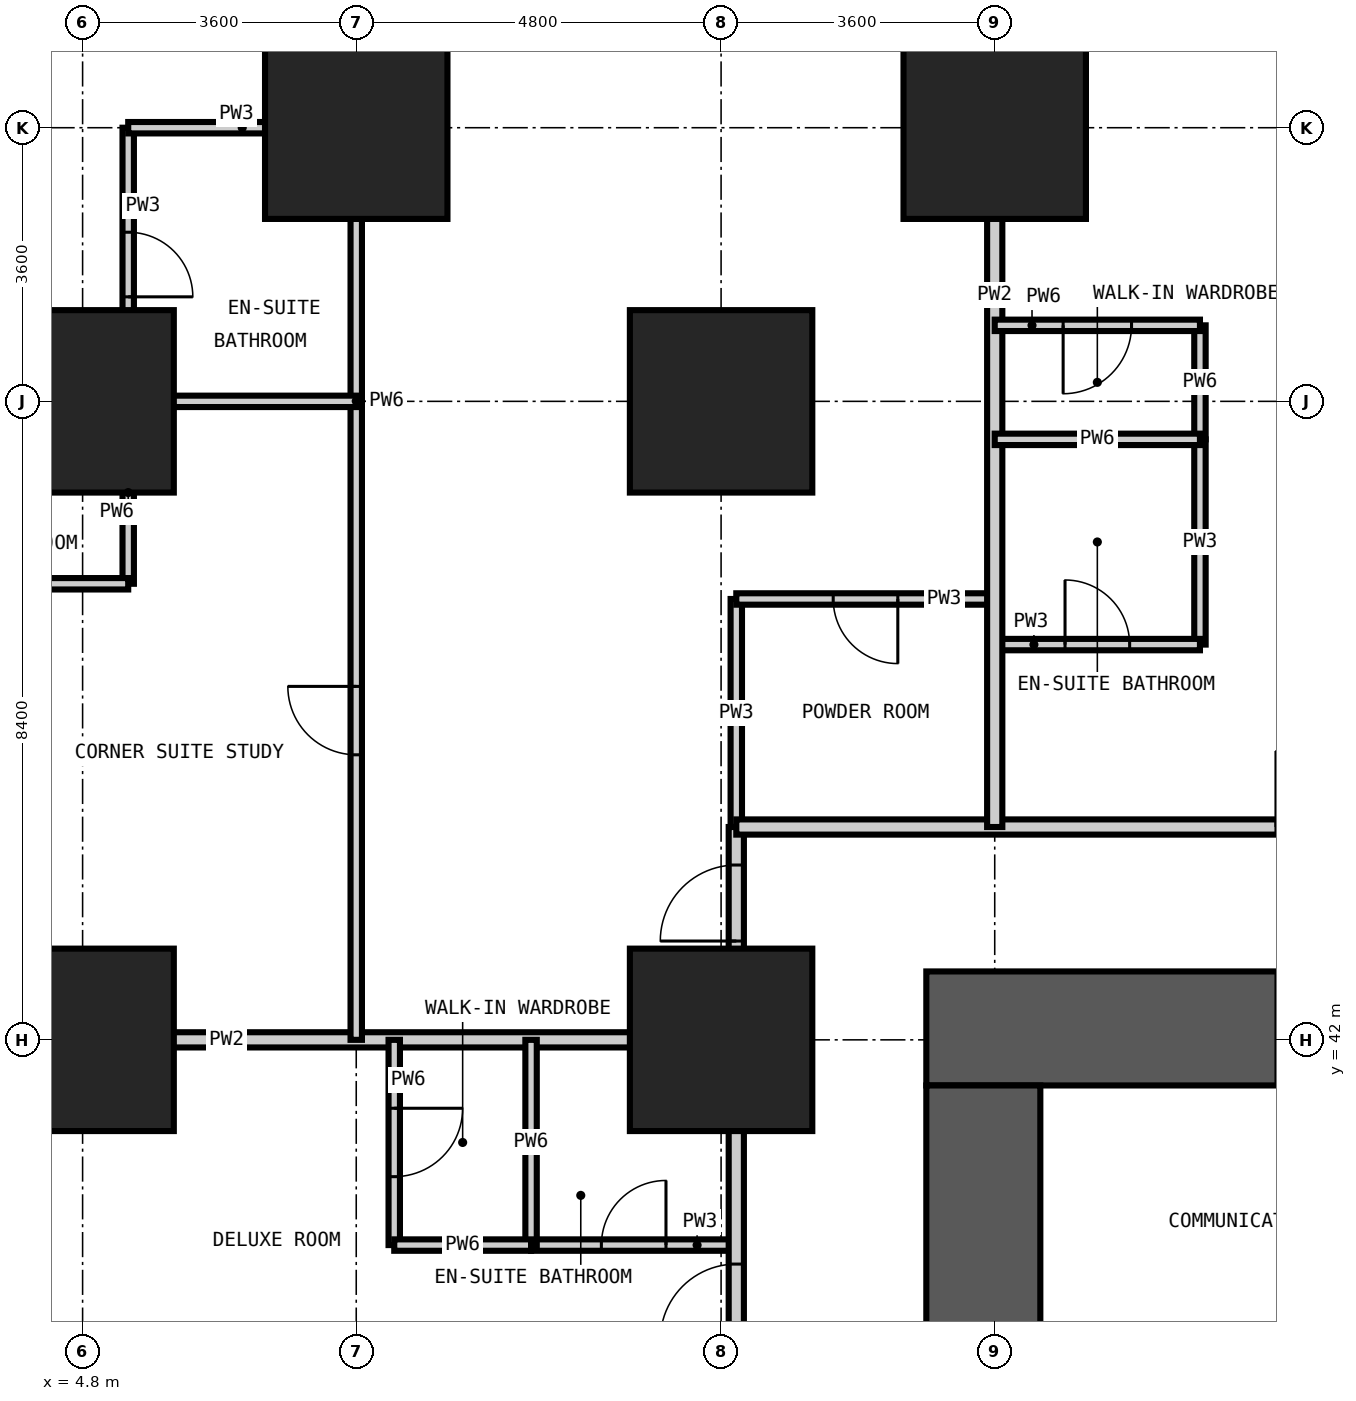
"""IFC4 building model, lengths in metres.
Left out: names, types, materials, properties, quantities, classifications, styles, units other than length and angle.
Written with IfcOpenShell. Run it as: python <this file> out.ifc"""

import sys

from ifc_helpers import new_model, si_unit, direction, frame, frame_2d, origin, origin_2d, place, context, subcontext, project, spatial, rectangle, extrude, element, fill, save


model = new_model("IFC4")
c1 = context("Model", 3, precision=1e-05, world=origin(), true_north=direction((0.0, 1.0)))
c2 = subcontext(c1, "Body", "Model", "MODEL_VIEW")
j1 = project(units=[si_unit("LENGTHUNIT", "METRE"), si_unit("PLANEANGLEUNIT", "RADIAN")], contexts=[c1])
p1 = place(None, origin())
s1 = spatial("IfcSite", under=j1, at=p1, CompositionType="ELEMENT")
p2 = place(p1, origin())
s2 = spatial("IfcBuilding", under=s1, at=p2, CompositionType="ELEMENT")
p3 = place(p2, frame((0.0, 0.0, 84.6)))
s3 = spatial("IfcBuildingStorey", under=s2, at=p3, CompositionType="ELEMENT", Elevation=84.6)
for number, where, z_axis, x_axis in (
    (1, (4.8, 42.0, -0.35), (0.0, 0.0, 1.0), (1.0, 0.0, 0.0)),
    (2, (4.8, 50.4, -0.35), (0.0, 0.0, 1.0), (1.0, 0.0, 0.0)),
    (3, (8.4, 54.0, -0.35), (0.0, 0.0, 1.0), (1.0, 0.0, 0.0)),
    (4, (13.2, 42.0, -0.35), (0.0, 0.0, 1.0), (1.0, 0.0, 0.0)),
    (5, (13.2, 50.4, -0.35), (0.0, 0.0, 1.0), (1.0, 0.0, 0.0)),
    (6, (16.8, 54.0, -0.35), (0.0, 0.0, 1.0), (1.0, 0.0, 0.0)),
):
    element("IfcColumn", number, at=place(p3, frame(where, z_axis=z_axis, x_axis=x_axis)), inside=s3, PredefinedType="COLUMN", context=c2, shape_type="SweptSolid", body=[
        extrude(rectangle(XDim=2.4, YDim=2.4, at=origin_2d()), origin(), (0.0, 0.0, 1.0), 3.55),
    ])
p4 = place(p3, frame((42.9, 42.15, -0.35), z_axis=(0.0, 0.0, 1.0), x_axis=(-1.0, 0.0, 0.0)))
e7 = element("IfcWall", 7, at=p4, inside=s3, PredefinedType="SHEAR", context=c2, shape_type="SweptSolid", body=[
    extrude(rectangle(XDim=27.0, YDim=1.5, at=frame_2d((13.5, 0.0))), origin(), (0.0, 0.0, 1.0), 3.55),
])
p5 = place(p4, frame((21.4, 0.0, 0.35)))
e8 = element("IfcOpeningElement", 8, at=p5, cuts=e7, PredefinedType="OPENING", context=c2, shape_type="SweptSolid", body=[
    extrude(rectangle(XDim=1.0, YDim=2.1, at=frame_2d((0.5, 1.05))), frame((0.0, 0.76, 0.0), z_axis=(0.0, -1.0, 0.0), x_axis=(1.0, 0.0, 0.0)), (0.0, 0.0, 1.0), 1.52),
])
p6 = place(p4, frame((10.8, 0.0, 0.35)))
e9 = element("IfcOpeningElement", 9, at=p6, cuts=e7, PredefinedType="OPENING", context=c2, shape_type="SweptSolid", body=[
    extrude(rectangle(XDim=1.2, YDim=2.2, at=frame_2d((0.6, 1.1))), frame((0.0, 0.76, 0.0), z_axis=(0.0, -1.0, 0.0), x_axis=(1.0, 0.0, 0.0)), (0.0, 0.0, 1.0), 1.52),
])
p7 = place(p3, frame((16.65, 41.4, -0.35), z_axis=(0.0, 0.0, 1.0), x_axis=(0.0, -1.0, 0.0)))
e10 = element("IfcWall", 10, at=p7, inside=s3, PredefinedType="SHEAR", context=c2, shape_type="SweptSolid", body=[
    extrude(rectangle(XDim=24.0, YDim=1.5, at=frame_2d((12.0, 0.0))), origin(), (0.0, 0.0, 1.0), 3.55),
])
p8 = place(p7, frame((11.1, 0.0, 0.35)))
e11 = element("IfcOpeningElement", 11, at=p8, cuts=e10, PredefinedType="OPENING", context=c2, shape_type="SweptSolid", body=[
    extrude(rectangle(XDim=1.8, YDim=2.2, at=frame_2d((0.9, 1.1))), frame((0.0, 0.76, 0.0), z_axis=(0.0, -1.0, 0.0), x_axis=(1.0, 0.0, 0.0)), (0.0, 0.0, 1.0), 1.52),
])
p9 = place(p7, frame((19.9, 0.0, 0.35)))
e12 = element("IfcOpeningElement", 12, at=p9, cuts=e10, PredefinedType="OPENING", context=c2, shape_type="SweptSolid", body=[
    extrude(rectangle(XDim=1.0, YDim=2.1, at=frame_2d((0.5, 1.05))), frame((0.0, 0.76, 0.0), z_axis=(0.0, -1.0, 0.0), x_axis=(1.0, 0.0, 0.0)), (0.0, 0.0, 1.0), 1.52),
])
p10 = place(p7, frame((5.2, 0.0, 0.35)))
e13 = element("IfcOpeningElement", 13, at=p10, cuts=e10, PredefinedType="OPENING", context=c2, shape_type="SweptSolid", body=[
    extrude(rectangle(XDim=1.0, YDim=2.1, at=frame_2d((0.5, 1.05))), frame((0.0, 0.76, 0.0), z_axis=(0.0, -1.0, 0.0), x_axis=(1.0, 0.0, 0.0)), (0.0, 0.0, 1.0), 1.52),
])
p11 = place(p3, frame((5.4, 50.4, 0.0), z_axis=(0.0, 0.0, 1.0), x_axis=(0.0, 1.0, 0.0)))
e14 = element("IfcWall", 14, at=p11, inside=s3, PredefinedType="PARTITIONING", context=c2, shape_type="SweptSolid", body=[
    extrude(rectangle(XDim=3.6, YDim=0.15, at=frame_2d((1.8, 0.0))), origin(), (0.0, 0.0, 1.0), 3.2),
])
p12 = place(p11, frame((1.375, 0.0, 0.0)))
e15 = element("IfcOpeningElement", 15, at=p12, cuts=e14, PredefinedType="OPENING", context=c2, shape_type="SweptSolid", body=[
    extrude(rectangle(XDim=0.85, YDim=2.1, at=frame_2d((0.425, 1.05))), frame((0.0, 0.085, 0.0), z_axis=(0.0, -1.0, 0.0), x_axis=(1.0, 0.0, 0.0)), (0.0, 0.0, 1.0), 0.17),
])
p13 = place(p3, frame((13.4, 44.8, 0.0), z_axis=(0.0, 0.0, 1.0), x_axis=(0.0, 1.0, 0.0)))
e16 = element("IfcWall", 16, at=p13, inside=s3, PredefinedType="PARTITIONING", context=c2, shape_type="SweptSolid", body=[
    extrude(rectangle(XDim=3.0, YDim=0.15, at=frame_2d((1.5, 0.0))), origin(), (0.0, 0.0, 1.0), 3.2),
])
p14 = place(p3, frame((19.5, 47.2, 0.0), z_axis=(0.0, 0.0, 1.0), x_axis=(0.0, 1.0, 0.0)))
e17 = element("IfcWall", 17, at=p14, inside=s3, PredefinedType="PARTITIONING", context=c2, shape_type="SweptSolid", body=[
    extrude(rectangle(XDim=2.7, YDim=0.15, at=frame_2d((1.35, 0.0))), origin(), (0.0, 0.0, 1.0), 3.2),
])
p15 = place(p3, frame((10.7, 39.3, 0.0), z_axis=(0.0, 0.0, 1.0), x_axis=(1.0, 0.0, 0.0)))
e18 = element("IfcWall", 18, at=p15, inside=s3, PredefinedType="PARTITIONING", context=c2, shape_type="SweptSolid", body=[
    extrude(rectangle(XDim=2.7, YDim=0.15, at=frame_2d((1.35, 0.0))), origin(), (0.0, 0.0, 1.0), 3.2),
])
p16 = place(p15, frame((0.925, 0.0, 0.0)))
e19 = element("IfcOpeningElement", 19, at=p16, cuts=e18, PredefinedType="OPENING", context=c2, shape_type="SweptSolid", body=[
    extrude(rectangle(XDim=0.85, YDim=2.1, at=frame_2d((0.425, 1.05))), frame((0.0, 0.085, 0.0), z_axis=(0.0, -1.0, 0.0), x_axis=(1.0, 0.0, 0.0)), (0.0, 0.0, 1.0), 0.17),
])
p17 = place(p3, frame((16.8, 47.2, 0.0), z_axis=(0.0, 0.0, 1.0), x_axis=(1.0, 0.0, 0.0)))
e20 = element("IfcWall", 20, at=p17, inside=s3, PredefinedType="PARTITIONING", context=c2, shape_type="SweptSolid", body=[
    extrude(rectangle(XDim=2.7, YDim=0.15, at=frame_2d((1.35, 0.0))), origin(), (0.0, 0.0, 1.0), 3.2),
])
p18 = place(p17, frame((0.925, 0.0, 0.0)))
e21 = element("IfcOpeningElement", 21, at=p18, cuts=e20, PredefinedType="OPENING", context=c2, shape_type="SweptSolid", body=[
    extrude(rectangle(XDim=0.85, YDim=2.1, at=frame_2d((0.425, 1.05))), frame((0.0, 0.085, 0.0), z_axis=(0.0, -1.0, 0.0), x_axis=(1.0, 0.0, 0.0)), (0.0, 0.0, 1.0), 0.17),
])
p19 = place(p3, frame((13.4, 47.8, 0.0), z_axis=(0.0, 0.0, 1.0), x_axis=(1.0, 0.0, 0.0)))
e22 = element("IfcWall", 22, at=p19, inside=s3, PredefinedType="PARTITIONING", context=c2, shape_type="SweptSolid", body=[
    extrude(rectangle(XDim=3.4, YDim=0.15, at=frame_2d((1.7, 0.0))), origin(), (0.0, 0.0, 1.0), 3.2),
])
p20 = place(p19, frame((1.275, 0.0, 0.0)))
e23 = element("IfcOpeningElement", 23, at=p20, cuts=e22, PredefinedType="OPENING", context=c2, shape_type="SweptSolid", body=[
    extrude(rectangle(XDim=0.85, YDim=2.1, at=frame_2d((0.425, 1.05))), frame((0.0, 0.085, 0.0), z_axis=(0.0, -1.0, 0.0), x_axis=(1.0, 0.0, 0.0)), (0.0, 0.0, 1.0), 0.17),
])
p21 = place(p3, frame((5.4, 54.0, 0.0), z_axis=(0.0, 0.0, 1.0), x_axis=(1.0, 0.0, 0.0)))
e24 = element("IfcWall", 24, at=p21, inside=s3, PredefinedType="PARTITIONING", context=c2, shape_type="SweptSolid", body=[
    extrude(rectangle(XDim=3.0, YDim=0.15, at=frame_2d((1.5, 0.0))), origin(), (0.0, 0.0, 1.0), 3.2),
])
p22 = place(p3, frame((13.4, 37.8, 0.0), z_axis=(0.0, 0.0, 1.0), x_axis=(0.0, 1.0, 0.0)))
e25 = element("IfcWall", 25, at=p22, inside=s3, PredefinedType="PARTITIONING", context=c2, shape_type="SweptSolid", body=[
    extrude(rectangle(XDim=7.0, YDim=0.2, at=frame_2d((3.5, 0.0))), origin(), (0.0, 0.0, 1.0), 3.2),
])
p23 = place(p22, frame((0.25, 0.0, 0.0)))
e26 = element("IfcOpeningElement", 26, at=p23, cuts=e25, PredefinedType="OPENING", context=c2, shape_type="SweptSolid", body=[
    extrude(rectangle(XDim=1.0, YDim=2.2, at=frame_2d((0.5, 1.1))), frame((0.0, 0.11, 0.0), z_axis=(0.0, -1.0, 0.0), x_axis=(1.0, 0.0, 0.0)), (0.0, 0.0, 1.0), 0.22),
])
p24 = place(p22, frame((5.5, 0.0, 0.0)))
e27 = element("IfcOpeningElement", 27, at=p24, cuts=e25, PredefinedType="OPENING", context=c2, shape_type="SweptSolid", body=[
    extrude(rectangle(XDim=1.0, YDim=2.2, at=frame_2d((0.5, 1.1))), frame((0.0, 0.11, 0.0), z_axis=(0.0, -1.0, 0.0), x_axis=(1.0, 0.0, 0.0)), (0.0, 0.0, 1.0), 0.22),
])
p25 = place(p3, frame((13.4, 44.8, 0.0), z_axis=(0.0, 0.0, 1.0), x_axis=(1.0, 0.0, 0.0)))
e28 = element("IfcWall", 28, at=p25, inside=s3, PredefinedType="PARTITIONING", context=c2, shape_type="SweptSolid", body=[
    extrude(rectangle(XDim=32.6, YDim=0.2, at=frame_2d((16.3, 0.0))), origin(), (0.0, 0.0, 1.0), 3.2),
])
p26 = place(p25, frame((7.1, 0.0, 0.0)))
e29 = element("IfcOpeningElement", 29, at=p26, cuts=e28, PredefinedType="OPENING", context=c2, shape_type="SweptSolid", body=[
    extrude(rectangle(XDim=1.0, YDim=2.2, at=frame_2d((0.5, 1.1))), frame((0.0, 0.11, 0.0), z_axis=(0.0, -1.0, 0.0), x_axis=(1.0, 0.0, 0.0)), (0.0, 0.0, 1.0), 0.22),
])
p27 = place(p25, frame((15.5, 0.0, 0.0)))
e30 = element("IfcOpeningElement", 30, at=p27, cuts=e28, PredefinedType="OPENING", context=c2, shape_type="SweptSolid", body=[
    extrude(rectangle(XDim=1.0, YDim=2.2, at=frame_2d((0.5, 1.1))), frame((0.0, 0.11, 0.0), z_axis=(0.0, -1.0, 0.0), x_axis=(1.0, 0.0, 0.0)), (0.0, 0.0, 1.0), 0.22),
])
p28 = place(p25, frame((23.9, 0.0, 0.0)))
e31 = element("IfcOpeningElement", 31, at=p28, cuts=e28, PredefinedType="OPENING", context=c2, shape_type="SweptSolid", body=[
    extrude(rectangle(XDim=1.0, YDim=2.2, at=frame_2d((0.5, 1.1))), frame((0.0, 0.11, 0.0), z_axis=(0.0, -1.0, 0.0), x_axis=(1.0, 0.0, 0.0)), (0.0, 0.0, 1.0), 0.22),
])
p29 = place(p3, frame((16.8, 44.8, 0.0), z_axis=(0.0, 0.0, 1.0), x_axis=(0.0, 1.0, 0.0)))
e32 = element("IfcWall", 32, at=p29, inside=s3, PredefinedType="PARTITIONING", context=c2, shape_type="SweptSolid", body=[
    extrude(rectangle(XDim=14.008, YDim=0.2, at=frame_2d((7.004, 0.0))), origin(), (0.0, 0.0, 1.0), 3.2),
])
p30 = place(p3, frame((-0.008, 42.0, 0.0), z_axis=(0.0, 0.0, 1.0), x_axis=(1.0, 0.0, 0.0)))
e33 = element("IfcWall", 33, at=p30, inside=s3, PredefinedType="PARTITIONING", context=c2, shape_type="SweptSolid", body=[
    extrude(rectangle(XDim=13.408, YDim=0.2, at=frame_2d((6.704, 0.0))), origin(), (0.0, 0.0, 1.0), 3.2),
])
p31 = place(p3, frame((5.4, 48.0, 0.0), z_axis=(0.0, 0.0, 1.0), x_axis=(0.0, 1.0, 0.0)))
e34 = element("IfcWall", 34, at=p31, inside=s3, PredefinedType="PARTITIONING", context=c2, shape_type="SweptSolid", body=[
    extrude(rectangle(XDim=2.4, YDim=0.15, at=frame_2d((1.2, 0.0))), origin(), (0.0, 0.0, 1.0), 3.2),
])
p32 = place(p3, frame((8.4, 42.0, 0.0), z_axis=(0.0, 0.0, 1.0), x_axis=(0.0, 1.0, 0.0)))
e35 = element("IfcWall", 35, at=p32, inside=s3, PredefinedType="PARTITIONING", context=c2, shape_type="SweptSolid", body=[
    extrude(rectangle(XDim=16.808, YDim=0.15, at=frame_2d((8.404, 0.0))), origin(), (0.0, 0.0, 1.0), 3.2),
])
p33 = place(p32, frame((13.95, 0.0, 0.0)))
e36 = element("IfcOpeningElement", 36, at=p33, cuts=e35, PredefinedType="OPENING", context=c2, shape_type="SweptSolid", body=[
    extrude(rectangle(XDim=0.9, YDim=2.1, at=frame_2d((0.45, 1.05))), frame((0.0, 0.085, 0.0), z_axis=(0.0, -1.0, 0.0), x_axis=(1.0, 0.0, 0.0)), (0.0, 0.0, 1.0), 0.17),
])
p34 = place(p32, frame((3.75, 0.0, 0.0)))
e37 = element("IfcOpeningElement", 37, at=p34, cuts=e35, PredefinedType="OPENING", context=c2, shape_type="SweptSolid", body=[
    extrude(rectangle(XDim=0.9, YDim=2.1, at=frame_2d((0.45, 1.05))), frame((0.0, 0.085, 0.0), z_axis=(0.0, -1.0, 0.0), x_axis=(1.0, 0.0, 0.0)), (0.0, 0.0, 1.0), 0.17),
])
p35 = place(p3, frame((8.9, 39.3, 0.0), z_axis=(0.0, 0.0, 1.0), x_axis=(0.0, 1.0, 0.0)))
e38 = element("IfcWall", 38, at=p35, inside=s3, PredefinedType="PARTITIONING", context=c2, shape_type="SweptSolid", body=[
    extrude(rectangle(XDim=2.7, YDim=0.15, at=frame_2d((1.35, 0.0))), origin(), (0.0, 0.0, 1.0), 3.2),
])
p36 = place(p35, frame((0.9, 0.0, 0.0)))
e39 = element("IfcOpeningElement", 39, at=p36, cuts=e38, PredefinedType="OPENING", context=c2, shape_type="SweptSolid", body=[
    extrude(rectangle(XDim=0.9, YDim=2.1, at=frame_2d((0.45, 1.05))), frame((0.0, 0.085, 0.0), z_axis=(0.0, -1.0, 0.0), x_axis=(1.0, 0.0, 0.0)), (0.0, 0.0, 1.0), 0.17),
])
p37 = place(p3, frame((10.7, 39.3, 0.0), z_axis=(0.0, 0.0, 1.0), x_axis=(0.0, 1.0, 0.0)))
e40 = element("IfcWall", 40, at=p37, inside=s3, PredefinedType="PARTITIONING", context=c2, shape_type="SweptSolid", body=[
    extrude(rectangle(XDim=2.7, YDim=0.15, at=frame_2d((1.35, 0.0))), origin(), (0.0, 0.0, 1.0), 3.2),
])
p38 = place(p3, frame((19.5, 49.9, 0.0), z_axis=(0.0, 0.0, 1.0), x_axis=(0.0, 1.0, 0.0)))
e41 = element("IfcWall", 41, at=p38, inside=s3, PredefinedType="PARTITIONING", context=c2, shape_type="SweptSolid", body=[
    extrude(rectangle(XDim=1.5, YDim=0.15, at=frame_2d((0.75, 0.0))), origin(), (0.0, 0.0, 1.0), 3.2),
])
p39 = place(p3, frame((8.9, 39.3, 0.0), z_axis=(0.0, 0.0, 1.0), x_axis=(1.0, 0.0, 0.0)))
e42 = element("IfcWall", 42, at=p39, inside=s3, PredefinedType="PARTITIONING", context=c2, shape_type="SweptSolid", body=[
    extrude(rectangle(XDim=1.8, YDim=0.15, at=frame_2d((0.9, 0.0))), origin(), (0.0, 0.0, 1.0), 3.2),
])
p40 = place(p3, frame((2.4, 48.0, 0.0), z_axis=(0.0, 0.0, 1.0), x_axis=(1.0, 0.0, 0.0)))
e43 = element("IfcWall", 43, at=p40, inside=s3, PredefinedType="PARTITIONING", context=c2, shape_type="SweptSolid", body=[
    extrude(rectangle(XDim=3.0, YDim=0.15, at=frame_2d((1.5, 0.0))), origin(), (0.0, 0.0, 1.0), 3.2),
])
p41 = place(p3, frame((16.8, 49.9, 0.0), z_axis=(0.0, 0.0, 1.0), x_axis=(1.0, 0.0, 0.0)))
e44 = element("IfcWall", 44, at=p41, inside=s3, PredefinedType="PARTITIONING", context=c2, shape_type="SweptSolid", body=[
    extrude(rectangle(XDim=2.7, YDim=0.15, at=frame_2d((1.35, 0.0))), origin(), (0.0, 0.0, 1.0), 3.2),
])
p42 = place(p3, frame((-0.008, 50.4, 0.0), z_axis=(0.0, 0.0, 1.0), x_axis=(1.0, 0.0, 0.0)))
e45 = element("IfcWall", 45, at=p42, inside=s3, PredefinedType="PARTITIONING", context=c2, shape_type="SweptSolid", body=[
    extrude(rectangle(XDim=8.408, YDim=0.15, at=frame_2d((4.204, 0.0))), origin(), (0.0, 0.0, 1.0), 3.2),
])
p43 = place(p42, frame((2.658, 0.0, 0.0)))
e46 = element("IfcOpeningElement", 46, at=p43, cuts=e45, PredefinedType="OPENING", context=c2, shape_type="SweptSolid", body=[
    extrude(rectangle(XDim=0.9, YDim=2.1, at=frame_2d((0.45, 1.05))), frame((0.0, 0.085, 0.0), z_axis=(0.0, -1.0, 0.0), x_axis=(1.0, 0.0, 0.0)), (0.0, 0.0, 1.0), 0.17),
])
p44 = place(p3, frame((16.8, 51.4, 0.0), z_axis=(0.0, 0.0, 1.0), x_axis=(1.0, 0.0, 0.0)))
e47 = element("IfcWall", 47, at=p44, inside=s3, PredefinedType="PARTITIONING", context=c2, shape_type="SweptSolid", body=[
    extrude(rectangle(XDim=2.7, YDim=0.15, at=frame_2d((1.35, 0.0))), origin(), (0.0, 0.0, 1.0), 3.2),
])
p45 = place(p44, frame((0.9, 0.0, 0.0)))
e48 = element("IfcOpeningElement", 48, at=p45, cuts=e47, PredefinedType="OPENING", context=c2, shape_type="SweptSolid", body=[
    extrude(rectangle(XDim=0.9, YDim=2.1, at=frame_2d((0.45, 1.05))), frame((0.0, 0.085, 0.0), z_axis=(0.0, -1.0, 0.0), x_axis=(1.0, 0.0, 0.0)), (0.0, 0.0, 1.0), 0.17),
])
p46 = place(p18, origin())
e49 = element("IfcDoor", 49, at=p46, inside=s3, OperationType="SINGLE_SWING_LEFT", PredefinedType="DOOR", context=c2, shape_type="SweptSolid", body=[
    extrude(rectangle(XDim=0.85, YDim=2.1, at=frame_2d((0.425, 1.05))), frame((0.0, 0.025, 0.0), z_axis=(0.0, -1.0, 0.0), x_axis=(1.0, 0.0, 0.0)), (0.0, 0.0, 1.0), 0.05),
])
fill(e21, e49)
p47 = place(p45, frame((0.9, 0.0, 0.0), z_axis=(0.0, 0.0, 1.0), x_axis=(-1.0, 0.0, 0.0)))
e50 = element("IfcDoor", 50, at=p47, inside=s3, OperationType="SINGLE_SWING_RIGHT", PredefinedType="DOOR", context=c2, shape_type="SweptSolid", body=[
    extrude(rectangle(XDim=0.9, YDim=2.1, at=frame_2d((0.45, 1.05))), frame((0.0, 0.025, 0.0), z_axis=(0.0, -1.0, 0.0), x_axis=(1.0, 0.0, 0.0)), (0.0, 0.0, 1.0), 0.05),
])
fill(e48, e50)
p48 = place(p23, origin())
e51 = element("IfcDoor", 51, at=p48, inside=s3, OperationType="SINGLE_SWING_LEFT", PredefinedType="DOOR", context=c2, shape_type="SweptSolid", body=[
    extrude(rectangle(XDim=1.0, YDim=2.2, at=frame_2d((0.5, 1.1))), frame((0.0, 0.025, 0.0), z_axis=(0.0, -1.0, 0.0), x_axis=(1.0, 0.0, 0.0)), (0.0, 0.0, 1.0), 0.05),
])
fill(e26, e51)
p49 = place(p16, origin())
e52 = element("IfcDoor", 52, at=p49, inside=s3, OperationType="SINGLE_SWING_RIGHT", PredefinedType="DOOR", context=c2, shape_type="SweptSolid", body=[
    extrude(rectangle(XDim=0.85, YDim=2.1, at=frame_2d((0.425, 1.05))), frame((0.0, 0.025, 0.0), z_axis=(0.0, -1.0, 0.0), x_axis=(1.0, 0.0, 0.0)), (0.0, 0.0, 1.0), 0.05),
])
fill(e19, e52)
p50 = place(p36, frame((0.9, 0.0, 0.0), z_axis=(0.0, 0.0, 1.0), x_axis=(-1.0, 0.0, 0.0)))
e53 = element("IfcDoor", 53, at=p50, inside=s3, OperationType="SINGLE_SWING_LEFT", PredefinedType="DOOR", context=c2, shape_type="SweptSolid", body=[
    extrude(rectangle(XDim=0.9, YDim=2.1, at=frame_2d((0.45, 1.05))), frame((0.0, 0.025, 0.0), z_axis=(0.0, -1.0, 0.0), x_axis=(1.0, 0.0, 0.0)), (0.0, 0.0, 1.0), 0.05),
])
fill(e39, e53)
p51 = place(p24, origin())
e54 = element("IfcDoor", 54, at=p51, inside=s3, OperationType="SINGLE_SWING_LEFT", PredefinedType="DOOR", context=c2, shape_type="SweptSolid", body=[
    extrude(rectangle(XDim=1.0, YDim=2.2, at=frame_2d((0.5, 1.1))), frame((0.0, 0.025, 0.0), z_axis=(0.0, -1.0, 0.0), x_axis=(1.0, 0.0, 0.0)), (0.0, 0.0, 1.0), 0.05),
])
fill(e27, e54)
p52 = place(p20, frame((0.85, 0.0, 0.0), z_axis=(0.0, 0.0, 1.0), x_axis=(-1.0, 0.0, 0.0)))
e55 = element("IfcDoor", 55, at=p52, inside=s3, OperationType="SINGLE_SWING_LEFT", PredefinedType="DOOR", context=c2, shape_type="SweptSolid", body=[
    extrude(rectangle(XDim=0.85, YDim=2.1, at=frame_2d((0.425, 1.05))), frame((0.0, 0.025, 0.0), z_axis=(0.0, -1.0, 0.0), x_axis=(1.0, 0.0, 0.0)), (0.0, 0.0, 1.0), 0.05),
])
fill(e23, e55)
p53 = place(p12, frame((0.85, 0.0, 0.0), z_axis=(0.0, 0.0, 1.0), x_axis=(-1.0, 0.0, 0.0)))
e56 = element("IfcDoor", 56, at=p53, inside=s3, OperationType="SINGLE_SWING_RIGHT", PredefinedType="DOOR", context=c2, shape_type="SweptSolid", body=[
    extrude(rectangle(XDim=0.85, YDim=2.1, at=frame_2d((0.425, 1.05))), frame((0.0, 0.025, 0.0), z_axis=(0.0, -1.0, 0.0), x_axis=(1.0, 0.0, 0.0)), (0.0, 0.0, 1.0), 0.05),
])
fill(e15, e56)
p54 = place(p34, origin())
e57 = element("IfcDoor", 57, at=p54, inside=s3, OperationType="SINGLE_SWING_RIGHT", PredefinedType="DOOR", context=c2, shape_type="SweptSolid", body=[
    extrude(rectangle(XDim=0.9, YDim=2.1, at=frame_2d((0.45, 1.05))), frame((0.0, 0.025, 0.0), z_axis=(0.0, -1.0, 0.0), x_axis=(1.0, 0.0, 0.0)), (0.0, 0.0, 1.0), 0.05),
])
fill(e37, e57)
save(model, sys.argv[1])
